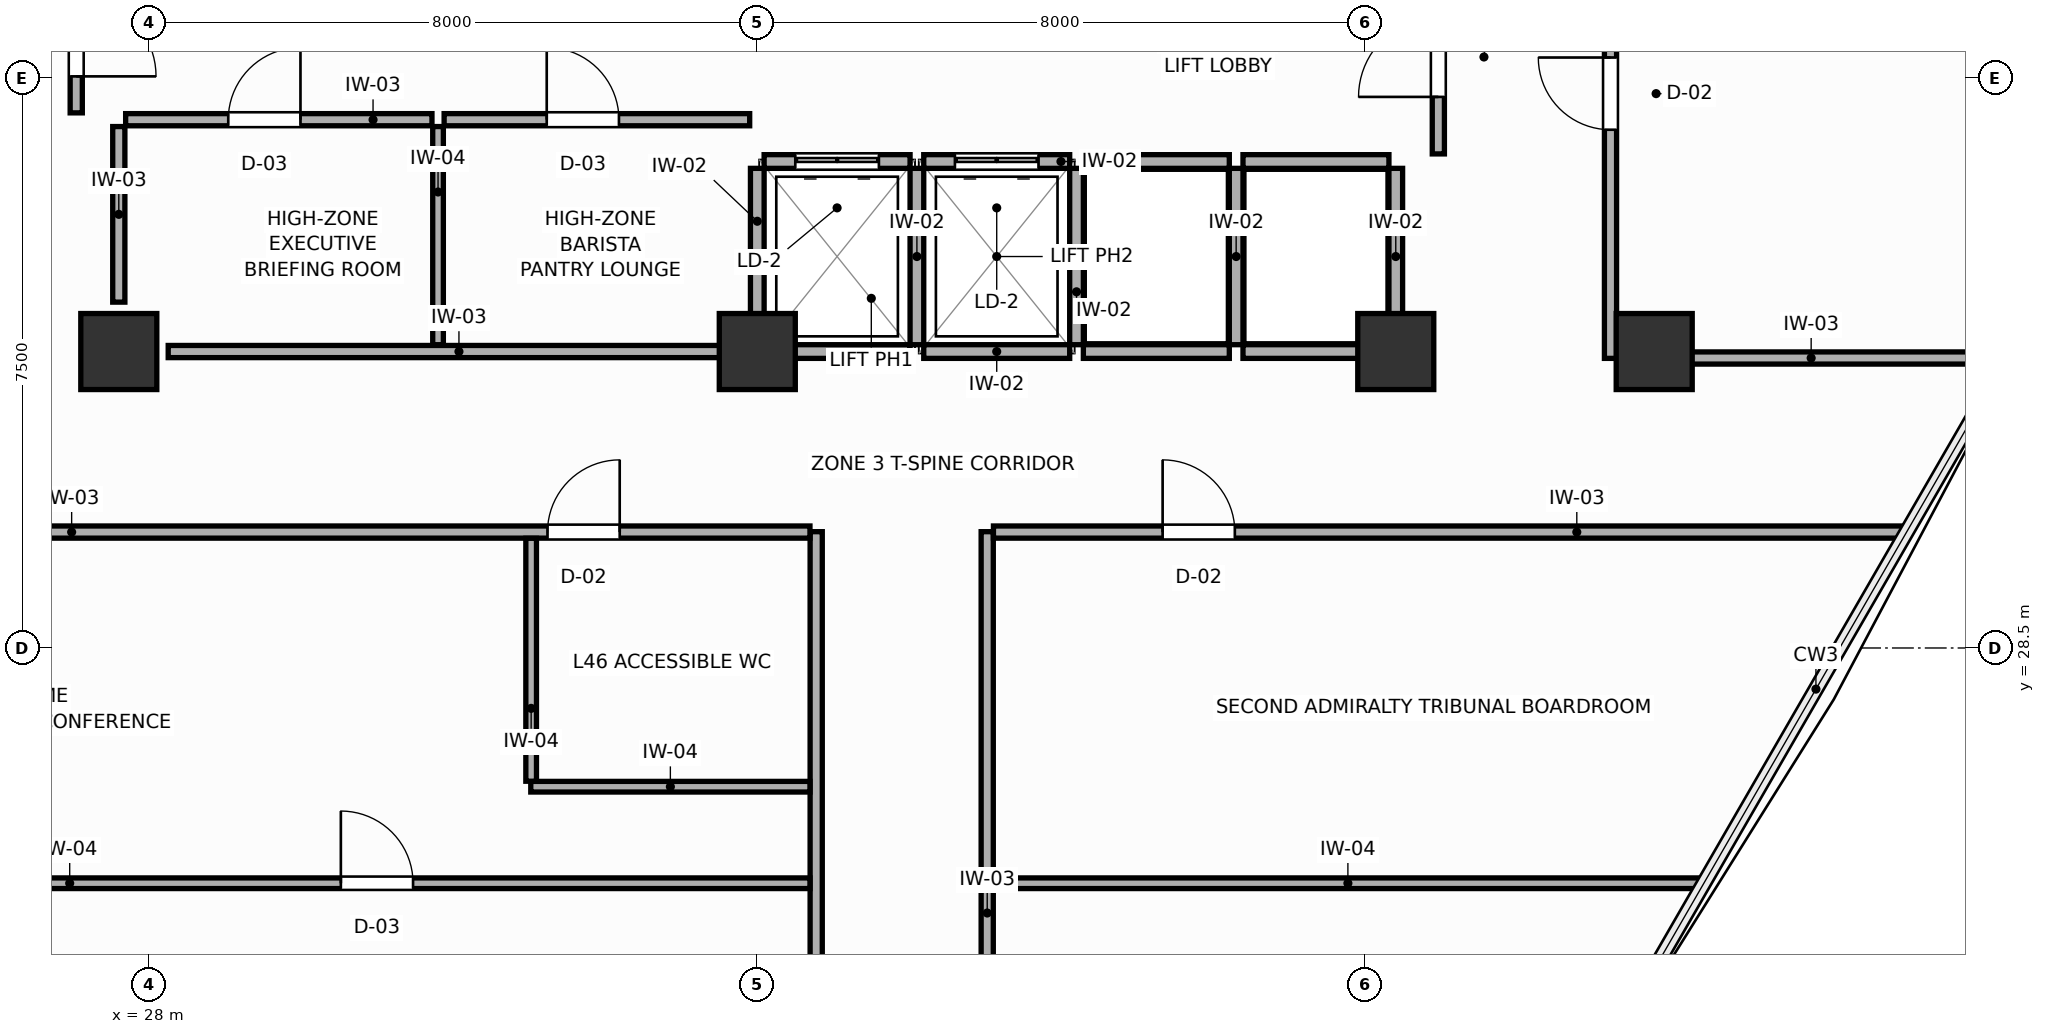
"""IFC4 building model, lengths in metres.
Left out: names, types, materials, properties, quantities, classifications, styles, units other than length and angle.
Written with IfcOpenShell. Run it as: python <this file> out.ifc"""

import sys

from ifc_helpers import new_model, si_unit, direction, frame, frame_2d, origin, origin_2d, place, context, subcontext, project, spatial, rectangle, extrude, source, transform, mapped, element, fill, save


model = new_model("IFC4")
c1 = context("Model", 3, precision=1e-05, world=origin(), true_north=direction((0.0, 1.0)))
c2 = subcontext(c1, "Body", "Model", "MODEL_VIEW")
j1 = project(units=[si_unit("LENGTHUNIT", "METRE"), si_unit("PLANEANGLEUNIT", "RADIAN")], contexts=[c1])
p1 = place(None, origin())
s1 = spatial("IfcSite", under=j1, at=p1, CompositionType="ELEMENT")
p2 = place(p1, origin())
s2 = spatial("IfcBuilding", under=s1, at=p2, CompositionType="ELEMENT")
p3 = place(p2, frame((0.0, 0.0, 179.4)))
s3 = spatial("IfcBuildingStorey", under=s2, at=p3, CompositionType="ELEMENT", Elevation=179.4)
m1 = source(origin(), c2, "Body", "SweptSolid", [
    extrude(rectangle(XDim=1.0, YDim=1.0, at=origin_2d()), origin(), (0.0, 0.0, 1.0), 3.6),
])
for number, where, z_axis, x_axis in (
    (1, (27.6, 32.4, 0.0), (0.0, 0.0, 1.0), (1.0, 0.0, 0.0)),
    (2, (44.4, 32.4, 0.0), (0.0, 0.0, 1.0), (1.0, 0.0, 0.0)),
    (3, (36.0, 32.4, 0.0), (0.0, 0.0, 1.0), (1.0, 0.0, 0.0)),
    (4, (47.8, 32.4, 0.0), (0.0, 0.0, 1.0), (1.0, 0.0, 0.0)),
):
    element("IfcColumn", number, at=place(p3, frame(where, z_axis=z_axis, x_axis=x_axis)), inside=s3, PredefinedType="COLUMN", context=c2, shape_type="MappedRepresentation", body=[
        mapped(m1, transform((0.0, 0.0, 0.0), scale=1.0)),
    ])
p4 = place(p3, frame((36.09, 34.9, 0.0), z_axis=(0.0, 0.0, 1.0), x_axis=(1.0, 0.0, 0.0)))
e5 = element("IfcWall", 5, at=p4, inside=s3, PredefinedType="PARTITIONING", context=c2, shape_type="SweptSolid", body=[
    extrude(rectangle(XDim=1.92, YDim=0.18, at=frame_2d((0.96, 0.0))), origin(), (0.0, 0.0, 1.0), 3.4),
])
p5 = place(p4, frame((0.41, 0.0, 0.0)))
e6 = element("IfcOpeningElement", 6, at=p5, cuts=e5, PredefinedType="OPENING", context=c2, shape_type="SweptSolid", body=[
    extrude(rectangle(XDim=1.1, YDim=2.1, at=frame_2d((0.55, 1.05))), frame((0.0, 0.1, 0.0), z_axis=(0.0, -1.0, 0.0), x_axis=(1.0, 0.0, 0.0)), (0.0, 0.0, 1.0), 0.2),
])
p6 = place(p3, frame((36.09, 32.4, 0.0), z_axis=(0.0, 0.0, 1.0), x_axis=(1.0, 0.0, 0.0)))
e7 = element("IfcWall", 7, at=p6, inside=s3, PredefinedType="PARTITIONING", context=c2, shape_type="SweptSolid", body=[
    extrude(rectangle(XDim=1.92, YDim=0.18, at=frame_2d((0.96, 0.0))), origin(), (0.0, 0.0, 1.0), 2.16),
])
p7 = place(p3, frame((36.0, 32.49, 0.0), z_axis=(0.0, 0.0, 1.0), x_axis=(0.0, 1.0, 0.0)))
e8 = element("IfcWall", 8, at=p7, inside=s3, PredefinedType="PARTITIONING", context=c2, shape_type="SweptSolid", body=[
    extrude(rectangle(XDim=2.32, YDim=0.18, at=frame_2d((1.16, 0.0))), origin(), (0.0, 0.0, 1.0), 3.4),
])
p8 = place(p3, frame((38.19, 34.9, 0.0), z_axis=(0.0, 0.0, 1.0), x_axis=(1.0, 0.0, 0.0)))
e9 = element("IfcWall", 9, at=p8, inside=s3, PredefinedType="PARTITIONING", context=c2, shape_type="SweptSolid", body=[
    extrude(rectangle(XDim=1.92, YDim=0.18, at=frame_2d((0.96, 0.0))), origin(), (0.0, 0.0, 1.0), 3.4),
])
p9 = place(p8, frame((0.41, 0.0, 0.0)))
e10 = element("IfcOpeningElement", 10, at=p9, cuts=e9, PredefinedType="OPENING", context=c2, shape_type="SweptSolid", body=[
    extrude(rectangle(XDim=1.1, YDim=2.1, at=frame_2d((0.55, 1.05))), frame((0.0, 0.1, 0.0), z_axis=(0.0, -1.0, 0.0), x_axis=(1.0, 0.0, 0.0)), (0.0, 0.0, 1.0), 0.2),
])
p10 = place(p3, frame((38.19, 32.4, 0.0), z_axis=(0.0, 0.0, 1.0), x_axis=(1.0, 0.0, 0.0)))
e11 = element("IfcWall", 11, at=p10, inside=s3, PredefinedType="PARTITIONING", context=c2, shape_type="SweptSolid", body=[
    extrude(rectangle(XDim=1.92, YDim=0.18, at=frame_2d((0.96, 0.0))), origin(), (0.0, 0.0, 1.0), 2.16),
])
p11 = place(p3, frame((38.1, 32.49, 0.0), z_axis=(0.0, 0.0, 1.0), x_axis=(0.0, 1.0, 0.0)))
e12 = element("IfcWall", 12, at=p11, inside=s3, PredefinedType="PARTITIONING", context=c2, shape_type="SweptSolid", body=[
    extrude(rectangle(XDim=2.32, YDim=0.18, at=frame_2d((1.16, 0.0))), origin(), (0.0, 0.0, 1.0), 3.4),
])
p12 = place(p3, frame((40.29, 34.9, 0.0), z_axis=(0.0, 0.0, 1.0), x_axis=(1.0, 0.0, 0.0)))
e13 = element("IfcWall", 13, at=p12, inside=s3, PredefinedType="PARTITIONING", context=c2, shape_type="SweptSolid", body=[
    extrude(rectangle(XDim=1.92, YDim=0.18, at=frame_2d((0.96, 0.0))), origin(), (0.0, 0.0, 1.0), 3.4),
])
p13 = place(p3, frame((40.29, 32.4, 0.0), z_axis=(0.0, 0.0, 1.0), x_axis=(1.0, 0.0, 0.0)))
e14 = element("IfcWall", 14, at=p13, inside=s3, PredefinedType="PARTITIONING", context=c2, shape_type="SweptSolid", body=[
    extrude(rectangle(XDim=1.92, YDim=0.18, at=frame_2d((0.96, 0.0))), origin(), (0.0, 0.0, 1.0), 2.16),
])
p14 = place(p3, frame((40.2, 32.49, 0.0), z_axis=(0.0, 0.0, 1.0), x_axis=(0.0, 1.0, 0.0)))
e15 = element("IfcWall", 15, at=p14, inside=s3, PredefinedType="PARTITIONING", context=c2, shape_type="SweptSolid", body=[
    extrude(rectangle(XDim=2.32, YDim=0.18, at=frame_2d((1.16, 0.0))), origin(), (0.0, 0.0, 1.0), 3.4),
])
p15 = place(p3, frame((42.39, 34.9, 0.0), z_axis=(0.0, 0.0, 1.0), x_axis=(1.0, 0.0, 0.0)))
e16 = element("IfcWall", 16, at=p15, inside=s3, PredefinedType="PARTITIONING", context=c2, shape_type="SweptSolid", body=[
    extrude(rectangle(XDim=1.92, YDim=0.18, at=frame_2d((0.96, 0.0))), origin(), (0.0, 0.0, 1.0), 3.4),
])
p16 = place(p3, frame((42.39, 32.4, 0.0), z_axis=(0.0, 0.0, 1.0), x_axis=(1.0, 0.0, 0.0)))
e17 = element("IfcWall", 17, at=p16, inside=s3, PredefinedType="PARTITIONING", context=c2, shape_type="SweptSolid", body=[
    extrude(rectangle(XDim=1.92, YDim=0.18, at=frame_2d((0.96, 0.0))), origin(), (0.0, 0.0, 1.0), 2.16),
])
for number, where, z_axis, x_axis in (
    (18, (42.3, 32.49, 0.0), (0.0, 0.0, 1.0), (0.0, 1.0, 0.0)),
    (19, (44.4, 32.49, 0.0), (0.0, 0.0, 1.0), (0.0, 1.0, 0.0)),
):
    element("IfcWall", number, at=place(p3, frame(where, z_axis=z_axis, x_axis=x_axis)), inside=s3, PredefinedType="PARTITIONING", context=c2, shape_type="SweptSolid", body=[
        extrude(rectangle(XDim=2.32, YDim=0.18, at=frame_2d((1.16, 0.0))), origin(), (0.0, 0.0, 1.0), 3.4),
    ])
p17 = place(p3, frame((28.25, 32.4, 0.0), z_axis=(0.0, 0.0, 1.0), x_axis=(1.0, 0.0, 0.0)))
e20 = element("IfcWall", 20, at=p17, inside=s3, PredefinedType="PARTITIONING", context=c2, shape_type="SweptSolid", body=[
    extrude(rectangle(XDim=7.65, YDim=0.16, at=frame_2d((3.825, 0.0))), origin(), (0.0, 0.0, 1.0), 2.16),
])
p18 = place(p3, frame((27.6, 33.05, 0.0), z_axis=(0.0, 0.0, 1.0), x_axis=(0.0, 1.0, 0.0)))
e21 = element("IfcWall", 21, at=p18, inside=s3, PredefinedType="PARTITIONING", context=c2, shape_type="SweptSolid", body=[
    extrude(rectangle(XDim=2.31, YDim=0.16, at=frame_2d((1.155, 0.0))), origin(), (0.0, 0.0, 1.0), 3.4),
])
p19 = place(p3, frame((31.8, 32.49, 0.0), z_axis=(0.0, 0.0, 1.0), x_axis=(0.0, 1.0, 0.0)))
e22 = element("IfcWall", 22, at=p19, inside=s3, PredefinedType="PARTITIONING", context=c2, shape_type="SweptSolid", body=[
    extrude(rectangle(XDim=2.87, YDim=0.14, at=frame_2d((1.435, 0.0))), origin(), (0.0, 0.0, 1.0), 3.4),
])
p20 = place(p3, frame((27.69, 35.45, 0.0), z_axis=(0.0, 0.0, 1.0), x_axis=(1.0, 0.0, 0.0)))
e23 = element("IfcWall", 23, at=p20, inside=s3, PredefinedType="PARTITIONING", context=c2, shape_type="SweptSolid", body=[
    extrude(rectangle(XDim=4.03, YDim=0.16, at=frame_2d((2.015, 0.0))), origin(), (0.0, 0.0, 1.0), 3.4),
])
p21 = place(p20, frame((1.35, 0.0, 0.0)))
e24 = element("IfcOpeningElement", 24, at=p21, cuts=e23, PredefinedType="OPENING", context=c2, shape_type="SweptSolid", body=[
    extrude(rectangle(XDim=0.95, YDim=2.05, at=frame_2d((0.475, 1.025))), frame((0.0, 0.09, 0.0), z_axis=(0.0, -1.0, 0.0), x_axis=(1.0, 0.0, 0.0)), (0.0, 0.0, 1.0), 0.18),
])
p22 = place(p3, frame((31.88, 35.45, 0.0), z_axis=(0.0, 0.0, 1.0), x_axis=(1.0, 0.0, 0.0)))
e25 = element("IfcWall", 25, at=p22, inside=s3, PredefinedType="PARTITIONING", context=c2, shape_type="SweptSolid", body=[
    extrude(rectangle(XDim=4.02, YDim=0.16, at=frame_2d((2.01, 0.0))), origin(), (0.0, 0.0, 1.0), 3.4),
])
p23 = place(p22, frame((1.35, 0.0, 0.0)))
e26 = element("IfcOpeningElement", 26, at=p23, cuts=e25, PredefinedType="OPENING", context=c2, shape_type="SweptSolid", body=[
    extrude(rectangle(XDim=0.95, YDim=2.05, at=frame_2d((0.475, 1.025))), frame((0.0, 0.09, 0.0), z_axis=(0.0, -1.0, 0.0), x_axis=(1.0, 0.0, 0.0)), (0.0, 0.0, 1.0), 0.18),
])
p24 = place(p3, frame((27.04, 35.54, 0.0), z_axis=(0.0, 0.0, 1.0), x_axis=(0.0, 1.0, 0.0)))
e27 = element("IfcWall", 27, at=p24, inside=s3, PredefinedType="PARTITIONING", context=c2, shape_type="SweptSolid", body=[
    extrude(rectangle(XDim=2.11, YDim=0.16, at=frame_2d((1.055, 0.0))), origin(), (0.0, 0.0, 1.0), 3.4),
])
p25 = place(p24, frame((0.48, 0.0, 0.0)))
e28 = element("IfcOpeningElement", 28, at=p25, cuts=e27, PredefinedType="OPENING", context=c2, shape_type="SweptSolid", body=[
    extrude(rectangle(XDim=1.05, YDim=2.1, at=frame_2d((0.525, 1.05))), frame((0.0, 0.09, 0.0), z_axis=(0.0, -1.0, 0.0), x_axis=(1.0, 0.0, 0.0)), (0.0, 0.0, 1.0), 0.18),
])
p26 = place(p3, frame((44.96, 35.0, 0.0), z_axis=(0.0, 0.0, 1.0), x_axis=(0.0, 1.0, 0.0)))
e29 = element("IfcWall", 29, at=p26, inside=s3, PredefinedType="PARTITIONING", context=c2, shape_type="SweptSolid", body=[
    extrude(rectangle(XDim=2.65, YDim=0.16, at=frame_2d((1.325, 0.0))), origin(), (0.0, 0.0, 1.0), 3.4),
])
p27 = place(p26, frame((0.75, 0.0, 0.0)))
e30 = element("IfcOpeningElement", 30, at=p27, cuts=e29, PredefinedType="OPENING", context=c2, shape_type="SweptSolid", body=[
    extrude(rectangle(XDim=1.05, YDim=2.1, at=frame_2d((0.525, 1.05))), frame((0.0, 0.09, 0.0), z_axis=(0.0, -1.0, 0.0), x_axis=(1.0, 0.0, 0.0)), (0.0, 0.0, 1.0), 0.18),
])
p28 = place(p3, frame((47.225, 32.31, 0.0), z_axis=(0.0, 0.0, 1.0), x_axis=(0.0, 1.0, 0.0)))
e31 = element("IfcWall", 31, at=p28, inside=s3, PredefinedType="PARTITIONING", context=c2, shape_type="SweptSolid", body=[
    extrude(rectangle(XDim=18.969, YDim=0.16, at=frame_2d((9.484, 0.0))), origin(), (0.0, 0.0, 1.0), 3.4),
])
p29 = place(p28, frame((3.008, 0.0, 0.0)))
e32 = element("IfcOpeningElement", 32, at=p29, cuts=e31, PredefinedType="OPENING", context=c2, shape_type="SweptSolid", body=[
    extrude(rectangle(XDim=0.95, YDim=2.05, at=frame_2d((0.475, 1.025))), frame((0.0, 0.09, 0.0), z_axis=(0.0, -1.0, 0.0), x_axis=(1.0, 0.0, 0.0)), (0.0, 0.0, 1.0), 0.18),
])
p30 = place(p28, frame((11.513, 0.0, 0.0)))
e33 = element("IfcOpeningElement", 33, at=p30, cuts=e31, PredefinedType="OPENING", context=c2, shape_type="SweptSolid", body=[
    extrude(rectangle(XDim=0.95, YDim=2.05, at=frame_2d((0.475, 1.025))), frame((0.0, 0.09, 0.0), z_axis=(0.0, -1.0, 0.0), x_axis=(1.0, 0.0, 0.0)), (0.0, 0.0, 1.0), 0.18),
])
p31 = place(p3, frame((36.775, 11.209, 0.0), z_axis=(0.0, 0.0, 1.0), x_axis=(0.0, 1.0, 0.0)))
e34 = element("IfcWall", 34, at=p31, inside=s3, PredefinedType="PARTITIONING", context=c2, shape_type="SweptSolid", body=[
    extrude(rectangle(XDim=18.821, YDim=0.16, at=frame_2d((9.41, 0.0))), origin(), (0.0, 0.0, 1.0), 3.4),
])
p32 = place(p31, frame((3.47, 0.0, 0.0)))
e35 = element("IfcOpeningElement", 35, at=p32, cuts=e34, PredefinedType="OPENING", context=c2, shape_type="SweptSolid", body=[
    extrude(rectangle(XDim=0.95, YDim=2.05, at=frame_2d((0.475, 1.025))), frame((0.0, 0.09, 0.0), z_axis=(0.0, -1.0, 0.0), x_axis=(1.0, 0.0, 0.0)), (0.0, 0.0, 1.0), 0.18),
])
p33 = place(p3, frame((39.025, 12.958, 0.0), z_axis=(0.0, 0.0, 1.0), x_axis=(0.0, 1.0, 0.0)))
e36 = element("IfcWall", 36, at=p33, inside=s3, PredefinedType="PARTITIONING", context=c2, shape_type="SweptSolid", body=[
    extrude(rectangle(XDim=17.072, YDim=0.16, at=frame_2d((8.536, 0.0))), origin(), (0.0, 0.0, 1.0), 3.4),
])
p34 = place(p33, frame((5.908, 0.0, 0.0)))
e37 = element("IfcOpeningElement", 37, at=p34, cuts=e36, PredefinedType="OPENING", context=c2, shape_type="SweptSolid", body=[
    extrude(rectangle(XDim=0.95, YDim=2.05, at=frame_2d((0.475, 1.025))), frame((0.0, 0.09, 0.0), z_axis=(0.0, -1.0, 0.0), x_axis=(1.0, 0.0, 0.0)), (0.0, 0.0, 1.0), 0.18),
])
p35 = place(p3, frame((20.899, 30.025, 0.0), z_axis=(0.0, 0.0, 1.0), x_axis=(1.0, 0.0, 0.0)))
e38 = element("IfcWall", 38, at=p35, inside=s3, PredefinedType="PARTITIONING", context=c2, shape_type="SweptSolid", body=[
    extrude(rectangle(XDim=15.794, YDim=0.16, at=frame_2d((7.897, 0.0))), origin(), (0.0, 0.0, 1.0), 3.4),
])
p36 = place(p35, frame((12.341, 0.0, 0.0)))
e39 = element("IfcOpeningElement", 39, at=p36, cuts=e38, PredefinedType="OPENING", context=c2, shape_type="SweptSolid", body=[
    extrude(rectangle(XDim=0.95, YDim=2.05, at=frame_2d((0.475, 1.025))), frame((0.0, 0.09, 0.0), z_axis=(0.0, -1.0, 0.0), x_axis=(1.0, 0.0, 0.0)), (0.0, 0.0, 1.0), 0.18),
])
p37 = place(p3, frame((39.107, 30.025, 0.0), z_axis=(0.0, 0.0, 1.0), x_axis=(1.0, 0.0, 0.0)))
e40 = element("IfcWall", 40, at=p37, inside=s3, PredefinedType="PARTITIONING", context=c2, shape_type="SweptSolid", body=[
    extrude(rectangle(XDim=11.994, YDim=0.16, at=frame_2d((5.997, 0.0))), origin(), (0.0, 0.0, 1.0), 3.4),
])
p38 = place(p37, frame((2.226, 0.0, 0.0)))
e41 = element("IfcOpeningElement", 41, at=p38, cuts=e40, PredefinedType="OPENING", context=c2, shape_type="SweptSolid", body=[
    extrude(rectangle(XDim=0.95, YDim=2.05, at=frame_2d((0.475, 1.025))), frame((0.0, 0.09, 0.0), z_axis=(0.0, -1.0, 0.0), x_axis=(1.0, 0.0, 0.0)), (0.0, 0.0, 1.0), 0.18),
])
p39 = place(p3, frame((47.307, 32.315, 0.0), z_axis=(0.0, 0.0, 1.0), x_axis=(1.0, 0.0, 0.0)))
e42 = element("IfcWall", 42, at=p39, inside=s3, PredefinedType="PARTITIONING", context=c2, shape_type="SweptSolid", body=[
    extrude(rectangle(XDim=5.116, YDim=0.16, at=frame_2d((2.558, 0.0))), origin(), (0.0, 0.0, 1.0), 2.16),
])
p40 = place(p3, frame((23.567, 25.405, 0.0), z_axis=(0.0, 0.0, 1.0), x_axis=(1.0, 0.0, 0.0)))
e43 = element("IfcWall", 43, at=p40, inside=s3, PredefinedType="PARTITIONING", context=c2, shape_type="SweptSolid", body=[
    extrude(rectangle(XDim=13.126, YDim=0.14, at=frame_2d((6.563, 0.0))), origin(), (0.0, 0.0, 1.0), 3.4),
])
p41 = place(p40, frame((6.955, 0.0, 0.0)))
e44 = element("IfcOpeningElement", 44, at=p41, cuts=e43, PredefinedType="OPENING", context=c2, shape_type="SweptSolid", body=[
    extrude(rectangle(XDim=0.95, YDim=2.05, at=frame_2d((0.475, 1.025))), frame((0.0, 0.08, 0.0), z_axis=(0.0, -1.0, 0.0), x_axis=(1.0, 0.0, 0.0)), (0.0, 0.0, 1.0), 0.16),
])
p42 = place(p3, frame((39.107, 25.405, 0.0), z_axis=(0.0, 0.0, 1.0), x_axis=(1.0, 0.0, 0.0)))
e45 = element("IfcWall", 45, at=p42, inside=s3, PredefinedType="PARTITIONING", context=c2, shape_type="SweptSolid", body=[
    extrude(rectangle(XDim=9.326, YDim=0.14, at=frame_2d((4.663, 0.0))), origin(), (0.0, 0.0, 1.0), 3.4),
])
p43 = place(p3, frame((33.02, 26.675, 0.0), z_axis=(0.0, 0.0, 1.0), x_axis=(1.0, 0.0, 0.0)))
e46 = element("IfcWall", 46, at=p43, inside=s3, PredefinedType="PARTITIONING", context=c2, shape_type="SweptSolid", body=[
    extrude(rectangle(XDim=3.673, YDim=0.14, at=frame_2d((1.836, 0.0))), origin(), (0.0, 0.0, 1.0), 3.4),
])
p44 = place(p3, frame((33.025, 26.747, 0.0), z_axis=(0.0, 0.0, 1.0), x_axis=(0.0, 1.0, 0.0)))
e47 = element("IfcWall", 47, at=p44, inside=s3, PredefinedType="PARTITIONING", context=c2, shape_type="SweptSolid", body=[
    extrude(rectangle(XDim=3.196, YDim=0.14, at=frame_2d((1.598, 0.0))), origin(), (0.0, 0.0, 1.0), 3.4),
])
p45 = place(p5, origin())
e48 = element("IfcDoor", 48, at=p45, inside=s3, OperationType="DOUBLE_DOOR_SLIDING", PredefinedType="DOOR", context=c2, shape_type="SweptSolid", body=[
    extrude(rectangle(XDim=1.1, YDim=2.1, at=frame_2d((0.55, 1.05))), frame((0.0, 0.025, 0.0), z_axis=(0.0, -1.0, 0.0), x_axis=(1.0, 0.0, 0.0)), (0.0, 0.0, 1.0), 0.05),
])
fill(e6, e48)
p46 = place(p9, origin())
e49 = element("IfcDoor", 49, at=p46, inside=s3, OperationType="DOUBLE_DOOR_SLIDING", PredefinedType="DOOR", context=c2, shape_type="SweptSolid", body=[
    extrude(rectangle(XDim=1.1, YDim=2.1, at=frame_2d((0.55, 1.05))), frame((0.0, 0.025, 0.0), z_axis=(0.0, -1.0, 0.0), x_axis=(1.0, 0.0, 0.0)), (0.0, 0.0, 1.0), 0.05),
])
fill(e10, e49)
p47 = place(p21, origin())
e50 = element("IfcDoor", 50, at=p47, inside=s3, OperationType="SINGLE_SWING_RIGHT", PredefinedType="DOOR", context=c2, shape_type="SweptSolid", body=[
    extrude(rectangle(XDim=0.95, YDim=2.05, at=frame_2d((0.475, 1.025))), frame((0.0, 0.025, 0.0), z_axis=(0.0, -1.0, 0.0), x_axis=(1.0, 0.0, 0.0)), (0.0, 0.0, 1.0), 0.05),
])
fill(e24, e50)
p48 = place(p23, origin())
e51 = element("IfcDoor", 51, at=p48, inside=s3, OperationType="SINGLE_SWING_LEFT", PredefinedType="DOOR", context=c2, shape_type="SweptSolid", body=[
    extrude(rectangle(XDim=0.95, YDim=2.05, at=frame_2d((0.475, 1.025))), frame((0.0, 0.025, 0.0), z_axis=(0.0, -1.0, 0.0), x_axis=(1.0, 0.0, 0.0)), (0.0, 0.0, 1.0), 0.05),
])
fill(e26, e51)
p49 = place(p25, frame((1.05, 0.0, 0.0), z_axis=(0.0, 0.0, 1.0), x_axis=(-1.0, 0.0, 0.0)))
e52 = element("IfcDoor", 52, at=p49, inside=s3, OperationType="SINGLE_SWING_RIGHT", PredefinedType="DOOR", context=c2, shape_type="SweptSolid", body=[
    extrude(rectangle(XDim=1.05, YDim=2.1, at=frame_2d((0.525, 1.05))), frame((0.0, 0.025, 0.0), z_axis=(0.0, -1.0, 0.0), x_axis=(1.0, 0.0, 0.0)), (0.0, 0.0, 1.0), 0.05),
])
fill(e28, e52)
p50 = place(p27, origin())
e53 = element("IfcDoor", 53, at=p50, inside=s3, OperationType="SINGLE_SWING_LEFT", PredefinedType="DOOR", context=c2, shape_type="SweptSolid", body=[
    extrude(rectangle(XDim=1.05, YDim=2.1, at=frame_2d((0.525, 1.05))), frame((0.0, 0.025, 0.0), z_axis=(0.0, -1.0, 0.0), x_axis=(1.0, 0.0, 0.0)), (0.0, 0.0, 1.0), 0.05),
])
fill(e30, e53)
p51 = place(p29, origin())
e54 = element("IfcDoor", 54, at=p51, inside=s3, OperationType="SINGLE_SWING_RIGHT", PredefinedType="DOOR", context=c2, shape_type="SweptSolid", body=[
    extrude(rectangle(XDim=0.95, YDim=2.05, at=frame_2d((0.475, 1.025))), frame((0.0, 0.025, 0.0), z_axis=(0.0, -1.0, 0.0), x_axis=(1.0, 0.0, 0.0)), (0.0, 0.0, 1.0), 0.05),
])
fill(e32, e54)
p52 = place(p36, origin())
e55 = element("IfcDoor", 55, at=p52, inside=s3, OperationType="SINGLE_SWING_RIGHT", PredefinedType="DOOR", context=c2, shape_type="SweptSolid", body=[
    extrude(rectangle(XDim=0.95, YDim=2.05, at=frame_2d((0.475, 1.025))), frame((0.0, 0.025, 0.0), z_axis=(0.0, -1.0, 0.0), x_axis=(1.0, 0.0, 0.0)), (0.0, 0.0, 1.0), 0.05),
])
fill(e39, e55)
p53 = place(p38, origin())
e56 = element("IfcDoor", 56, at=p53, inside=s3, OperationType="SINGLE_SWING_LEFT", PredefinedType="DOOR", context=c2, shape_type="SweptSolid", body=[
    extrude(rectangle(XDim=0.95, YDim=2.05, at=frame_2d((0.475, 1.025))), frame((0.0, 0.025, 0.0), z_axis=(0.0, -1.0, 0.0), x_axis=(1.0, 0.0, 0.0)), (0.0, 0.0, 1.0), 0.05),
])
fill(e41, e56)
p54 = place(p41, origin())
e57 = element("IfcDoor", 57, at=p54, inside=s3, OperationType="SINGLE_SWING_LEFT", PredefinedType="DOOR", context=c2, shape_type="SweptSolid", body=[
    extrude(rectangle(XDim=0.95, YDim=2.05, at=frame_2d((0.475, 1.025))), frame((0.0, 0.025, 0.0), z_axis=(0.0, -1.0, 0.0), x_axis=(1.0, 0.0, 0.0)), (0.0, 0.0, 1.0), 0.05),
])
fill(e44, e57)
save(model, sys.argv[1])
